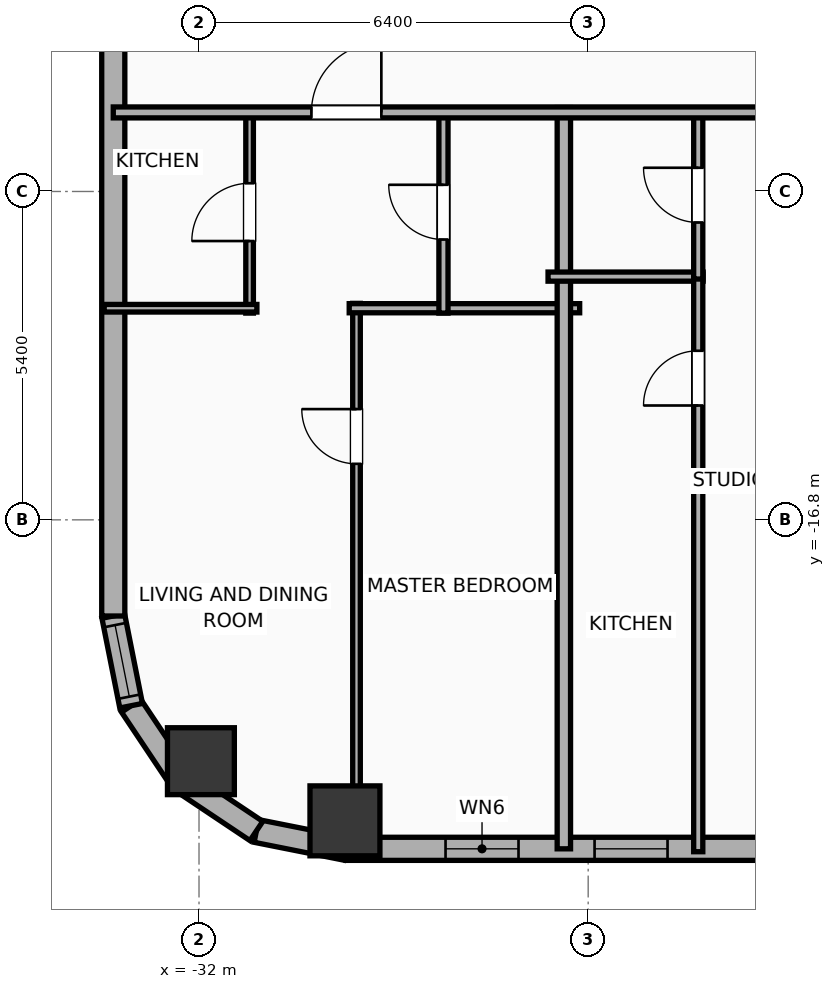
"""IFC4 building model, lengths in metres.
Left out: names, types, materials, properties, quantities, classifications, styles, units other than length and angle.
Written with IfcOpenShell. Run it as: python <this file> out.ifc"""

import sys

from ifc_helpers import new_model, si_unit, direction, frame, frame_2d, origin, origin_2d, place, context, subcontext, project, spatial, rectangle, hollow_rectangle, hollow_circle, extrude, element, fill, save


model = new_model("IFC4")
c1 = context("Model", 3, precision=1e-05, world=origin(), true_north=direction((0.0, 1.0)))
c2 = subcontext(c1, "Body", "Model", "MODEL_VIEW")
j1 = project(units=[si_unit("LENGTHUNIT", "METRE"), si_unit("PLANEANGLEUNIT", "RADIAN")], contexts=[c1])
p1 = place(None, origin())
s1 = spatial("IfcSite", under=j1, at=p1, CompositionType="ELEMENT")
p2 = place(p1, origin())
s2 = spatial("IfcBuilding", under=s1, at=p2, CompositionType="ELEMENT")
p3 = place(p2, frame((0.0, 0.0, 33.8)))
s3 = spatial("IfcBuildingStorey", under=s2, at=p3, CompositionType="ELEMENT", Elevation=33.8)
p4 = place(p3, frame((-29.6, -21.75, 0.0), z_axis=(0.0, 0.0, 1.0), x_axis=(1.0, 0.0, 0.0)))
e1 = element("IfcColumn", 1, at=p4, inside=s3, PredefinedType="COLUMN", context=c2, shape_type="SweptSolid", body=[
    extrude(hollow_rectangle(XDim=1.15, YDim=1.15, WallThickness=0.04, at=origin_2d()), origin(), (0.0, 0.0, 1.0), 3.9),
])
p5 = place(p3, frame((-31.969, -20.769, 0.0), z_axis=(0.0, 0.0, 1.0), x_axis=(1.0, 0.0, 0.0)))
e2 = element("IfcColumn", 2, at=p5, inside=s3, PredefinedType="COLUMN", context=c2, shape_type="SweptSolid", body=[
    extrude(hollow_circle(Radius=0.55, WallThickness=0.036, at=origin_2d()), origin(), (0.0, 0.0, 1.0), 3.9),
])
p6 = place(p3, frame((22.381, -22.21, 0.0), z_axis=(0.0, 0.0, 1.0), x_axis=(-1.0, 0.0, 0.0)))
e3 = element("IfcWall", 3, at=p6, inside=s3, PredefinedType="ELEMENTEDWALL", context=c2, shape_type="SweptSolid", body=[
    extrude(rectangle(XDim=51.963, YDim=0.38, at=frame_2d((25.981, 0.0))), origin(), (0.0, 0.0, 1.0), 3.65),
])
p7 = place(p6, frame((49.127, 0.0, 0.75)))
e4 = element("IfcOpeningElement", 4, at=p7, cuts=e3, PredefinedType="OPENING", context=c2, shape_type="SweptSolid", body=[
    extrude(rectangle(XDim=1.2, YDim=2.05, at=frame_2d((0.6, 1.025))), frame((0.0, 0.2, 0.0), z_axis=(0.0, -1.0, 0.0), x_axis=(1.0, 0.0, 0.0)), (0.0, 0.0, 1.0), 0.4),
])
p8 = place(p6, frame((43.926, 0.0, 0.75)))
e5 = element("IfcOpeningElement", 5, at=p8, cuts=e3, PredefinedType="OPENING", context=c2, shape_type="SweptSolid", body=[
    extrude(rectangle(XDim=1.2, YDim=2.05, at=frame_2d((0.6, 1.025))), frame((0.0, 0.2, 0.0), z_axis=(0.0, -1.0, 0.0), x_axis=(1.0, 0.0, 0.0)), (0.0, 0.0, 1.0), 0.4),
])
p9 = place(p6, frame((46.676, 0.0, 0.75)))
e6 = element("IfcOpeningElement", 6, at=p9, cuts=e3, PredefinedType="OPENING", context=c2, shape_type="SweptSolid", body=[
    extrude(rectangle(XDim=1.2, YDim=2.05, at=frame_2d((0.6, 1.025))), frame((0.0, 0.2, 0.0), z_axis=(0.0, -1.0, 0.0), x_axis=(1.0, 0.0, 0.0)), (0.0, 0.0, 1.0), 0.4),
])
p10 = place(p6, frame((39.531, 0.0, 0.75)))
e7 = element("IfcOpeningElement", 7, at=p10, cuts=e3, PredefinedType="OPENING", context=c2, shape_type="SweptSolid", body=[
    extrude(rectangle(XDim=1.2, YDim=2.05, at=frame_2d((0.6, 1.025))), frame((0.0, 0.2, 0.0), z_axis=(0.0, -1.0, 0.0), x_axis=(1.0, 0.0, 0.0)), (0.0, 0.0, 1.0), 0.4),
])
p11 = place(p6, frame((32.926, 0.0, 0.75)))
e8 = element("IfcOpeningElement", 8, at=p11, cuts=e3, PredefinedType="OPENING", context=c2, shape_type="SweptSolid", body=[
    extrude(rectangle(XDim=1.2, YDim=2.05, at=frame_2d((0.6, 1.025))), frame((0.0, 0.2, 0.0), z_axis=(0.0, -1.0, 0.0), x_axis=(1.0, 0.0, 0.0)), (0.0, 0.0, 1.0), 0.4),
])
p12 = place(p6, frame((35.676, 0.0, 0.75)))
e9 = element("IfcOpeningElement", 9, at=p12, cuts=e3, PredefinedType="OPENING", context=c2, shape_type="SweptSolid", body=[
    extrude(rectangle(XDim=1.2, YDim=2.05, at=frame_2d((0.6, 1.025))), frame((0.0, 0.2, 0.0), z_axis=(0.0, -1.0, 0.0), x_axis=(1.0, 0.0, 0.0)), (0.0, 0.0, 1.0), 0.4),
])
p13 = place(p6, frame((28.531, 0.0, 0.75)))
e10 = element("IfcOpeningElement", 10, at=p13, cuts=e3, PredefinedType="OPENING", context=c2, shape_type="SweptSolid", body=[
    extrude(rectangle(XDim=1.2, YDim=2.05, at=frame_2d((0.6, 1.025))), frame((0.0, 0.2, 0.0), z_axis=(0.0, -1.0, 0.0), x_axis=(1.0, 0.0, 0.0)), (0.0, 0.0, 1.0), 0.4),
])
p14 = place(p6, frame((21.926, 0.0, 0.75)))
e11 = element("IfcOpeningElement", 11, at=p14, cuts=e3, PredefinedType="OPENING", context=c2, shape_type="SweptSolid", body=[
    extrude(rectangle(XDim=1.2, YDim=2.05, at=frame_2d((0.6, 1.025))), frame((0.0, 0.2, 0.0), z_axis=(0.0, -1.0, 0.0), x_axis=(1.0, 0.0, 0.0)), (0.0, 0.0, 1.0), 0.4),
])
p15 = place(p6, frame((24.676, 0.0, 0.75)))
e12 = element("IfcOpeningElement", 12, at=p15, cuts=e3, PredefinedType="OPENING", context=c2, shape_type="SweptSolid", body=[
    extrude(rectangle(XDim=1.2, YDim=2.05, at=frame_2d((0.6, 1.025))), frame((0.0, 0.2, 0.0), z_axis=(0.0, -1.0, 0.0), x_axis=(1.0, 0.0, 0.0)), (0.0, 0.0, 1.0), 0.4),
])
p16 = place(p6, frame((18.636, 0.0, 0.75)))
e13 = element("IfcOpeningElement", 13, at=p16, cuts=e3, PredefinedType="OPENING", context=c2, shape_type="SweptSolid", body=[
    extrude(rectangle(XDim=1.2, YDim=2.05, at=frame_2d((0.6, 1.025))), frame((0.0, 0.2, 0.0), z_axis=(0.0, -1.0, 0.0), x_axis=(1.0, 0.0, 0.0)), (0.0, 0.0, 1.0), 0.4),
])
p17 = place(p6, frame((15.886, 0.0, 0.75)))
e14 = element("IfcOpeningElement", 14, at=p17, cuts=e3, PredefinedType="OPENING", context=c2, shape_type="SweptSolid", body=[
    extrude(rectangle(XDim=1.2, YDim=2.05, at=frame_2d((0.6, 1.025))), frame((0.0, 0.2, 0.0), z_axis=(0.0, -1.0, 0.0), x_axis=(1.0, 0.0, 0.0)), (0.0, 0.0, 1.0), 0.4),
])
p18 = place(p6, frame((12.031, 0.0, 0.75)))
e15 = element("IfcOpeningElement", 15, at=p18, cuts=e3, PredefinedType="OPENING", context=c2, shape_type="SweptSolid", body=[
    extrude(rectangle(XDim=1.2, YDim=2.05, at=frame_2d((0.6, 1.025))), frame((0.0, 0.2, 0.0), z_axis=(0.0, -1.0, 0.0), x_axis=(1.0, 0.0, 0.0)), (0.0, 0.0, 1.0), 0.4),
])
p19 = place(p6, frame((7.636, 0.0, 0.75)))
e16 = element("IfcOpeningElement", 16, at=p19, cuts=e3, PredefinedType="OPENING", context=c2, shape_type="SweptSolid", body=[
    extrude(rectangle(XDim=1.2, YDim=2.05, at=frame_2d((0.6, 1.025))), frame((0.0, 0.2, 0.0), z_axis=(0.0, -1.0, 0.0), x_axis=(1.0, 0.0, 0.0)), (0.0, 0.0, 1.0), 0.4),
])
p20 = place(p6, frame((4.886, 0.0, 0.75)))
e17 = element("IfcOpeningElement", 17, at=p20, cuts=e3, PredefinedType="OPENING", context=c2, shape_type="SweptSolid", body=[
    extrude(rectangle(XDim=1.2, YDim=2.05, at=frame_2d((0.6, 1.025))), frame((0.0, 0.2, 0.0), z_axis=(0.0, -1.0, 0.0), x_axis=(1.0, 0.0, 0.0)), (0.0, 0.0, 1.0), 0.4),
])
p21 = place(p6, frame((2.036, 0.0, 0.75)))
e18 = element("IfcOpeningElement", 18, at=p21, cuts=e3, PredefinedType="OPENING", context=c2, shape_type="SweptSolid", body=[
    extrude(rectangle(XDim=1.2, YDim=2.05, at=frame_2d((0.6, 1.025))), frame((0.0, 0.2, 0.0), z_axis=(0.0, -1.0, 0.0), x_axis=(1.0, 0.0, 0.0)), (0.0, 0.0, 1.0), 0.4),
])
p22 = place(p3, frame((-29.581, -22.21, 0.0), z_axis=(0.0, 0.0, 1.0), x_axis=(-0.980786132421, 0.195086038585, 0.0)))
e19 = element("IfcWall", 19, at=p22, inside=s3, PredefinedType="ELEMENTEDWALL", context=c2, shape_type="SweptSolid", body=[
    extrude(rectangle(XDim=1.504, YDim=0.38, at=frame_2d((0.752, 0.0))), origin(), (0.0, 0.0, 1.0), 3.65),
])
p23 = place(p3, frame((-31.057, -21.917, 0.0), z_axis=(0.0, 0.0, 1.0), x_axis=(-0.831442848281, 0.555610286119, 0.0)))
e20 = element("IfcWall", 20, at=p23, inside=s3, PredefinedType="ELEMENTEDWALL", context=c2, shape_type="SweptSolid", body=[
    extrude(rectangle(XDim=1.485, YDim=0.38, at=frame_2d((0.743, 0.0))), origin(), (0.0, 0.0, 1.0), 3.65),
])
p24 = place(p3, frame((-32.292, -21.091, 0.0), z_axis=(0.0, 0.0, 1.0), x_axis=(-0.555572577804, 0.831468045563, 0.0)))
e21 = element("IfcWall", 21, at=p24, inside=s3, PredefinedType="ELEMENTEDWALL", context=c2, shape_type="SweptSolid", body=[
    extrude(rectangle(XDim=1.485, YDim=0.38, at=frame_2d((0.742, 0.0))), origin(), (0.0, 0.0, 1.0), 3.65),
])
p25 = place(p3, frame((-33.116, -19.857, 0.0), z_axis=(0.0, 0.0, 1.0), x_axis=(-0.195086038585, 0.980786132421, 0.0)))
e22 = element("IfcWall", 22, at=p25, inside=s3, PredefinedType="ELEMENTEDWALL", context=c2, shape_type="SweptSolid", body=[
    extrude(rectangle(XDim=1.504, YDim=0.38, at=frame_2d((0.752, 0.0))), origin(), (0.0, 0.0, 1.0), 3.65),
])
p26 = place(p25, frame((0.152, 0.0, 0.75)))
e23 = element("IfcOpeningElement", 23, at=p26, cuts=e22, PredefinedType="OPENING", context=c2, shape_type="SweptSolid", body=[
    extrude(rectangle(XDim=1.2, YDim=2.05, at=frame_2d((0.6, 1.025))), frame((0.0, 0.2, 0.0), z_axis=(0.0, -1.0, 0.0), x_axis=(1.0, 0.0, 0.0)), (0.0, 0.0, 1.0), 0.4),
])
p27 = place(p3, frame((-33.41, -18.381, 0.0), z_axis=(0.0, 0.0, 1.0), x_axis=(0.0, 1.0, 0.0)))
e24 = element("IfcWall", 24, at=p27, inside=s3, PredefinedType="ELEMENTEDWALL", context=c2, shape_type="SweptSolid", body=[
    extrude(rectangle(XDim=36.763, YDim=0.38, at=frame_2d((18.381, 0.0))), origin(), (0.0, 0.0, 1.0), 3.65),
])
p28 = place(p27, frame((32.857, 0.0, 0.75)))
e25 = element("IfcOpeningElement", 25, at=p28, cuts=e24, PredefinedType="OPENING", context=c2, shape_type="SweptSolid", body=[
    extrude(rectangle(XDim=1.2, YDim=2.05, at=frame_2d((0.6, 1.025))), frame((0.0, 0.2, 0.0), z_axis=(0.0, -1.0, 0.0), x_axis=(1.0, 0.0, 0.0)), (0.0, 0.0, 1.0), 0.4),
])
p29 = place(p27, frame((22.126, 0.0, 0.75)))
e26 = element("IfcOpeningElement", 26, at=p29, cuts=e24, PredefinedType="OPENING", context=c2, shape_type="SweptSolid", body=[
    extrude(rectangle(XDim=1.2, YDim=2.05, at=frame_2d((0.6, 1.025))), frame((0.0, 0.2, 0.0), z_axis=(0.0, -1.0, 0.0), x_axis=(1.0, 0.0, 0.0)), (0.0, 0.0, 1.0), 0.4),
])
p30 = place(p27, frame((13.576, 0.0, 0.75)))
e27 = element("IfcOpeningElement", 27, at=p30, cuts=e24, PredefinedType="OPENING", context=c2, shape_type="SweptSolid", body=[
    extrude(rectangle(XDim=1.2, YDim=2.05, at=frame_2d((0.6, 1.025))), frame((0.0, 0.2, 0.0), z_axis=(0.0, -1.0, 0.0), x_axis=(1.0, 0.0, 0.0)), (0.0, 0.0, 1.0), 0.4),
])
p31 = place(p3, frame((-29.41, -22.36, 0.0), z_axis=(0.0, 0.0, 1.0), x_axis=(0.0, 1.0, 0.0)))
e28 = element("IfcWall", 28, at=p31, inside=s3, PredefinedType="PARTITIONING", context=c2, shape_type="SweptSolid", body=[
    extrude(rectangle(XDim=9.12, YDim=0.125, at=frame_2d((4.56, 0.0))), origin(), (0.0, 0.0, 1.0), 3.65),
])
p32 = place(p31, frame((6.481, 0.0, 0.0)))
e29 = element("IfcOpeningElement", 29, at=p32, cuts=e28, PredefinedType="OPENING", context=c2, shape_type="SweptSolid", body=[
    extrude(rectangle(XDim=0.9, YDim=2.05, at=frame_2d((0.45, 1.025))), frame((0.0, 0.073, 0.0), z_axis=(0.0, -1.0, 0.0), x_axis=(1.0, 0.0, 0.0)), (0.0, 0.0, 1.0), 0.145),
])
p33 = place(p3, frame((-29.53, -13.32, 0.0), z_axis=(0.0, 0.0, 1.0), x_axis=(1.0, 0.0, 0.0)))
e30 = element("IfcWall", 30, at=p33, inside=s3, PredefinedType="PLUMBINGWALL", context=c2, shape_type="SweptSolid", body=[
    extrude(rectangle(XDim=3.79, YDim=0.15, at=frame_2d((1.895, 0.0))), origin(), (0.0, 0.0, 1.0), 3.65),
])
p34 = place(p3, frame((-31.168, -13.4, 0.0), z_axis=(0.0, 0.0, 1.0), x_axis=(0.0, 1.0, 0.0)))
e31 = element("IfcWall", 31, at=p34, inside=s3, PredefinedType="PARTITIONING", context=c2, shape_type="SweptSolid", body=[
    extrude(rectangle(XDim=3.32, YDim=0.125, at=frame_2d((1.66, 0.0))), origin(), (0.0, 0.0, 1.0), 3.65),
])
p35 = place(p34, frame((1.185, 0.0, 0.0)))
e32 = element("IfcOpeningElement", 32, at=p35, cuts=e31, PredefinedType="OPENING", context=c2, shape_type="SweptSolid", body=[
    extrude(rectangle(XDim=0.95, YDim=2.05, at=frame_2d((0.475, 1.025))), frame((0.0, 0.073, 0.0), z_axis=(0.0, -1.0, 0.0), x_axis=(1.0, 0.0, 0.0)), (0.0, 0.0, 1.0), 0.145),
])
p36 = place(p3, frame((-33.56, -13.32, 0.0), z_axis=(0.0, 0.0, 1.0), x_axis=(1.0, 0.0, 0.0)))
e33 = element("IfcWall", 33, at=p36, inside=s3, PredefinedType="PARTITIONING", context=c2, shape_type="SweptSolid", body=[
    extrude(rectangle(XDim=2.512, YDim=0.125, at=frame_2d((1.256, 0.0))), origin(), (0.0, 0.0, 1.0), 3.65),
])
p37 = place(p3, frame((-27.98, -13.4, 0.0), z_axis=(0.0, 0.0, 1.0), x_axis=(0.0, 1.0, 0.0)))
e34 = element("IfcWall", 34, at=p37, inside=s3, PredefinedType="PLUMBINGWALL", context=c2, shape_type="SweptSolid", body=[
    extrude(rectangle(XDim=3.32, YDim=0.15, at=frame_2d((1.66, 0.0))), origin(), (0.0, 0.0, 1.0), 3.65),
])
p38 = place(p37, frame((1.21, 0.0, 0.0)))
e35 = element("IfcOpeningElement", 35, at=p38, cuts=e34, PredefinedType="OPENING", context=c2, shape_type="SweptSolid", body=[
    extrude(rectangle(XDim=0.9, YDim=2.05, at=frame_2d((0.45, 1.025))), frame((0.0, 0.085, 0.0), z_axis=(0.0, -1.0, 0.0), x_axis=(1.0, 0.0, 0.0)), (0.0, 0.0, 1.0), 0.17),
])
p39 = place(p3, frame((-26.0, -22.21, 0.0), z_axis=(0.0, 0.0, 1.0), x_axis=(0.0, 1.0, 0.0)))
e36 = element("IfcWall", 36, at=p39, inside=s3, PredefinedType="PARTITIONING", context=c2, shape_type="SweptSolid", body=[
    extrude(rectangle(XDim=12.19, YDim=0.22, at=frame_2d((6.095, 0.0))), origin(), (0.0, 0.0, 1.0), 3.65),
])
p40 = place(p3, frame((-26.26, -12.8, 0.0), z_axis=(0.0, 0.0, 1.0), x_axis=(1.0, 0.0, 0.0)))
e37 = element("IfcWall", 37, at=p40, inside=s3, PredefinedType="PLUMBINGWALL", context=c2, shape_type="SweptSolid", body=[
    extrude(rectangle(XDim=2.55, YDim=0.15, at=frame_2d((1.275, 0.0))), origin(), (0.0, 0.0, 1.0), 3.65),
])
p41 = place(p3, frame((-23.79, -22.258, 0.0), z_axis=(0.0, 0.0, 1.0), x_axis=(0.0, 1.0, 0.0)))
e38 = element("IfcWall", 38, at=p41, inside=s3, PredefinedType="PLUMBINGWALL", context=c2, shape_type="SweptSolid", body=[
    extrude(rectangle(XDim=9.498, YDim=0.15, at=frame_2d((4.749, 0.0))), origin(), (0.0, 0.0, 1.0), 3.65),
])
p42 = place(p41, frame((7.338, 0.0, 0.0)))
e39 = element("IfcOpeningElement", 39, at=p42, cuts=e38, PredefinedType="OPENING", context=c2, shape_type="SweptSolid", body=[
    extrude(rectangle(XDim=0.9, YDim=2.05, at=frame_2d((0.45, 1.025))), frame((0.0, 0.085, 0.0), z_axis=(0.0, -1.0, 0.0), x_axis=(1.0, 0.0, 0.0)), (0.0, 0.0, 1.0), 0.17),
])
p43 = place(p3, frame((-23.79, -12.84, 0.0), z_axis=(0.0, 0.0, 1.0), x_axis=(0.0, 1.0, 0.0)))
e40 = element("IfcWall", 40, at=p43, inside=s3, PredefinedType="PLUMBINGWALL", context=c2, shape_type="SweptSolid", body=[
    extrude(rectangle(XDim=2.76, YDim=0.15, at=frame_2d((1.38, 0.0))), origin(), (0.0, 0.0, 1.0), 3.65),
])
p44 = place(p43, frame((0.93, 0.0, 0.0)))
e41 = element("IfcOpeningElement", 41, at=p44, cuts=e40, PredefinedType="OPENING", context=c2, shape_type="SweptSolid", body=[
    extrude(rectangle(XDim=0.9, YDim=2.05, at=frame_2d((0.45, 1.025))), frame((0.0, 0.085, 0.0), z_axis=(0.0, -1.0, 0.0), x_axis=(1.0, 0.0, 0.0)), (0.0, 0.0, 1.0), 0.17),
])
p45 = place(p3, frame((-33.41, -10.1, 0.0), z_axis=(0.0, 0.0, 1.0), x_axis=(1.0, 0.0, 0.0)))
e42 = element("IfcWall", 42, at=p45, inside=s3, PredefinedType="PARTITIONING", context=c2, shape_type="SweptSolid", body=[
    extrude(rectangle(XDim=59.62, YDim=0.18, at=frame_2d((29.81, 0.0))), origin(), (0.0, 0.0, 1.0), 3.65),
])
p46 = place(p45, frame((3.259, 0.0, 0.0)))
e43 = element("IfcOpeningElement", 43, at=p46, cuts=e42, PredefinedType="OPENING", context=c2, shape_type="SweptSolid", body=[
    extrude(rectangle(XDim=1.15, YDim=2.05, at=frame_2d((0.575, 1.025))), frame((0.0, 0.1, 0.0), z_axis=(0.0, -1.0, 0.0), x_axis=(1.0, 0.0, 0.0)), (0.0, 0.0, 1.0), 0.2),
])
p47 = place(p45, frame((10.657, 0.0, 0.0)))
e44 = element("IfcOpeningElement", 44, at=p47, cuts=e42, PredefinedType="OPENING", context=c2, shape_type="SweptSolid", body=[
    extrude(rectangle(XDim=1.15, YDim=2.05, at=frame_2d((0.575, 1.025))), frame((0.0, 0.1, 0.0), z_axis=(0.0, -1.0, 0.0), x_axis=(1.0, 0.0, 0.0)), (0.0, 0.0, 1.0), 0.2),
])
p48 = place(p45, frame((15.421, 0.0, 0.0)))
e45 = element("IfcOpeningElement", 45, at=p48, cuts=e42, PredefinedType="OPENING", context=c2, shape_type="SweptSolid", body=[
    extrude(rectangle(XDim=0.9, YDim=2.05, at=frame_2d((0.45, 1.025))), frame((0.0, 0.1, 0.0), z_axis=(0.0, -1.0, 0.0), x_axis=(1.0, 0.0, 0.0)), (0.0, 0.0, 1.0), 0.2),
])
p49 = place(p45, frame((21.657, 0.0, 0.0)))
e46 = element("IfcOpeningElement", 46, at=p49, cuts=e42, PredefinedType="OPENING", context=c2, shape_type="SweptSolid", body=[
    extrude(rectangle(XDim=1.15, YDim=2.05, at=frame_2d((0.575, 1.025))), frame((0.0, 0.1, 0.0), z_axis=(0.0, -1.0, 0.0), x_axis=(1.0, 0.0, 0.0)), (0.0, 0.0, 1.0), 0.2),
])
p50 = place(p45, frame((26.421, 0.0, 0.0)))
e47 = element("IfcOpeningElement", 47, at=p50, cuts=e42, PredefinedType="OPENING", context=c2, shape_type="SweptSolid", body=[
    extrude(rectangle(XDim=0.9, YDim=2.05, at=frame_2d((0.45, 1.025))), frame((0.0, 0.1, 0.0), z_axis=(0.0, -1.0, 0.0), x_axis=(1.0, 0.0, 0.0)), (0.0, 0.0, 1.0), 0.2),
])
p51 = place(p45, frame((32.657, 0.0, 0.0)))
e48 = element("IfcOpeningElement", 48, at=p51, cuts=e42, PredefinedType="OPENING", context=c2, shape_type="SweptSolid", body=[
    extrude(rectangle(XDim=1.15, YDim=2.05, at=frame_2d((0.575, 1.025))), frame((0.0, 0.1, 0.0), z_axis=(0.0, -1.0, 0.0), x_axis=(1.0, 0.0, 0.0)), (0.0, 0.0, 1.0), 0.2),
])
p52 = place(p45, frame((36.008, 0.0, 0.0)))
e49 = element("IfcOpeningElement", 49, at=p52, cuts=e42, PredefinedType="OPENING", context=c2, shape_type="SweptSolid", body=[
    extrude(rectangle(XDim=1.15, YDim=2.05, at=frame_2d((0.575, 1.025))), frame((0.0, 0.1, 0.0), z_axis=(0.0, -1.0, 0.0), x_axis=(1.0, 0.0, 0.0)), (0.0, 0.0, 1.0), 0.2),
])
p53 = place(p45, frame((42.917, 0.0, 0.0)))
e50 = element("IfcOpeningElement", 50, at=p53, cuts=e42, PredefinedType="OPENING", context=c2, shape_type="SweptSolid", body=[
    extrude(rectangle(XDim=0.9, YDim=2.05, at=frame_2d((0.45, 1.025))), frame((0.0, 0.1, 0.0), z_axis=(0.0, -1.0, 0.0), x_axis=(1.0, 0.0, 0.0)), (0.0, 0.0, 1.0), 0.2),
])
p54 = place(p45, frame((47.008, 0.0, 0.0)))
e51 = element("IfcOpeningElement", 51, at=p54, cuts=e42, PredefinedType="OPENING", context=c2, shape_type="SweptSolid", body=[
    extrude(rectangle(XDim=1.15, YDim=2.05, at=frame_2d((0.575, 1.025))), frame((0.0, 0.1, 0.0), z_axis=(0.0, -1.0, 0.0), x_axis=(1.0, 0.0, 0.0)), (0.0, 0.0, 1.0), 0.2),
])
p55 = place(p45, frame((55.14, 0.0, 0.0)))
e52 = element("IfcOpeningElement", 52, at=p55, cuts=e42, PredefinedType="OPENING", context=c2, shape_type="SweptSolid", body=[
    extrude(rectangle(XDim=1.15, YDim=2.05, at=frame_2d((0.575, 1.025))), frame((0.0, 0.1, 0.0), z_axis=(0.0, -1.0, 0.0), x_axis=(1.0, 0.0, 0.0)), (0.0, 0.0, 1.0), 0.2),
])
p56 = place(p26, origin())
e53 = element("IfcWindow", 53, at=p56, inside=s3, PartitioningType="SINGLE_PANEL", PredefinedType="WINDOW", context=c2, shape_type="SweptSolid", body=[
    extrude(rectangle(XDim=1.2, YDim=2.05, at=frame_2d((0.6, 1.025))), frame((0.0, 0.03, 0.0), z_axis=(0.0, -1.0, 0.0), x_axis=(1.0, 0.0, 0.0)), (0.0, 0.0, 1.0), 0.06),
])
fill(e23, e53)
p57 = place(p7, origin())
e54 = element("IfcWindow", 54, at=p57, inside=s3, PartitioningType="SINGLE_PANEL", PredefinedType="WINDOW", context=c2, shape_type="SweptSolid", body=[
    extrude(rectangle(XDim=1.2, YDim=2.05, at=frame_2d((0.6, 1.025))), frame((0.0, 0.03, 0.0), z_axis=(0.0, -1.0, 0.0), x_axis=(1.0, 0.0, 0.0)), (0.0, 0.0, 1.0), 0.06),
])
fill(e4, e54)
p58 = place(p9, origin())
e55 = element("IfcWindow", 55, at=p58, inside=s3, PartitioningType="SINGLE_PANEL", PredefinedType="WINDOW", context=c2, shape_type="SweptSolid", body=[
    extrude(rectangle(XDim=1.2, YDim=2.05, at=frame_2d((0.6, 1.025))), frame((0.0, 0.03, 0.0), z_axis=(0.0, -1.0, 0.0), x_axis=(1.0, 0.0, 0.0)), (0.0, 0.0, 1.0), 0.06),
])
fill(e6, e55)
p59 = place(p32, origin())
e56 = element("IfcDoor", 56, at=p59, inside=s3, OperationType="SINGLE_SWING_RIGHT", PredefinedType="DOOR", context=c2, shape_type="SweptSolid", body=[
    extrude(rectangle(XDim=0.9, YDim=2.05, at=frame_2d((0.45, 1.025))), frame((0.0, 0.025, 0.0), z_axis=(0.0, -1.0, 0.0), x_axis=(1.0, 0.0, 0.0)), (0.0, 0.0, 1.0), 0.05),
])
fill(e29, e56)
p60 = place(p35, origin())
e57 = element("IfcDoor", 57, at=p60, inside=s3, OperationType="SINGLE_SWING_LEFT", PredefinedType="DOOR", context=c2, shape_type="SweptSolid", body=[
    extrude(rectangle(XDim=0.95, YDim=2.05, at=frame_2d((0.475, 1.025))), frame((0.0, 0.025, 0.0), z_axis=(0.0, -1.0, 0.0), x_axis=(1.0, 0.0, 0.0)), (0.0, 0.0, 1.0), 0.05),
])
fill(e32, e57)
p61 = place(p38, origin())
e58 = element("IfcDoor", 58, at=p61, inside=s3, OperationType="SINGLE_SWING_RIGHT", PredefinedType="DOOR", context=c2, shape_type="SweptSolid", body=[
    extrude(rectangle(XDim=0.9, YDim=2.05, at=frame_2d((0.45, 1.025))), frame((0.0, 0.025, 0.0), z_axis=(0.0, -1.0, 0.0), x_axis=(1.0, 0.0, 0.0)), (0.0, 0.0, 1.0), 0.05),
])
fill(e35, e58)
p62 = place(p42, origin())
e59 = element("IfcDoor", 59, at=p62, inside=s3, OperationType="SINGLE_SWING_LEFT", PredefinedType="DOOR", context=c2, shape_type="SweptSolid", body=[
    extrude(rectangle(XDim=0.9, YDim=2.05, at=frame_2d((0.45, 1.025))), frame((0.0, 0.025, 0.0), z_axis=(0.0, -1.0, 0.0), x_axis=(1.0, 0.0, 0.0)), (0.0, 0.0, 1.0), 0.05),
])
fill(e39, e59)
p63 = place(p44, origin())
e60 = element("IfcDoor", 60, at=p63, inside=s3, OperationType="SINGLE_SWING_RIGHT", PredefinedType="DOOR", context=c2, shape_type="SweptSolid", body=[
    extrude(rectangle(XDim=0.9, YDim=2.05, at=frame_2d((0.45, 1.025))), frame((0.0, 0.025, 0.0), z_axis=(0.0, -1.0, 0.0), x_axis=(1.0, 0.0, 0.0)), (0.0, 0.0, 1.0), 0.05),
])
fill(e41, e60)
p64 = place(p46, origin())
e61 = element("IfcDoor", 61, at=p64, inside=s3, OperationType="SINGLE_SWING_RIGHT", PredefinedType="DOOR", context=c2, shape_type="SweptSolid", body=[
    extrude(rectangle(XDim=1.15, YDim=2.05, at=frame_2d((0.575, 1.025))), frame((0.0, 0.025, 0.0), z_axis=(0.0, -1.0, 0.0), x_axis=(1.0, 0.0, 0.0)), (0.0, 0.0, 1.0), 0.05),
])
fill(e43, e61)
save(model, sys.argv[1])
